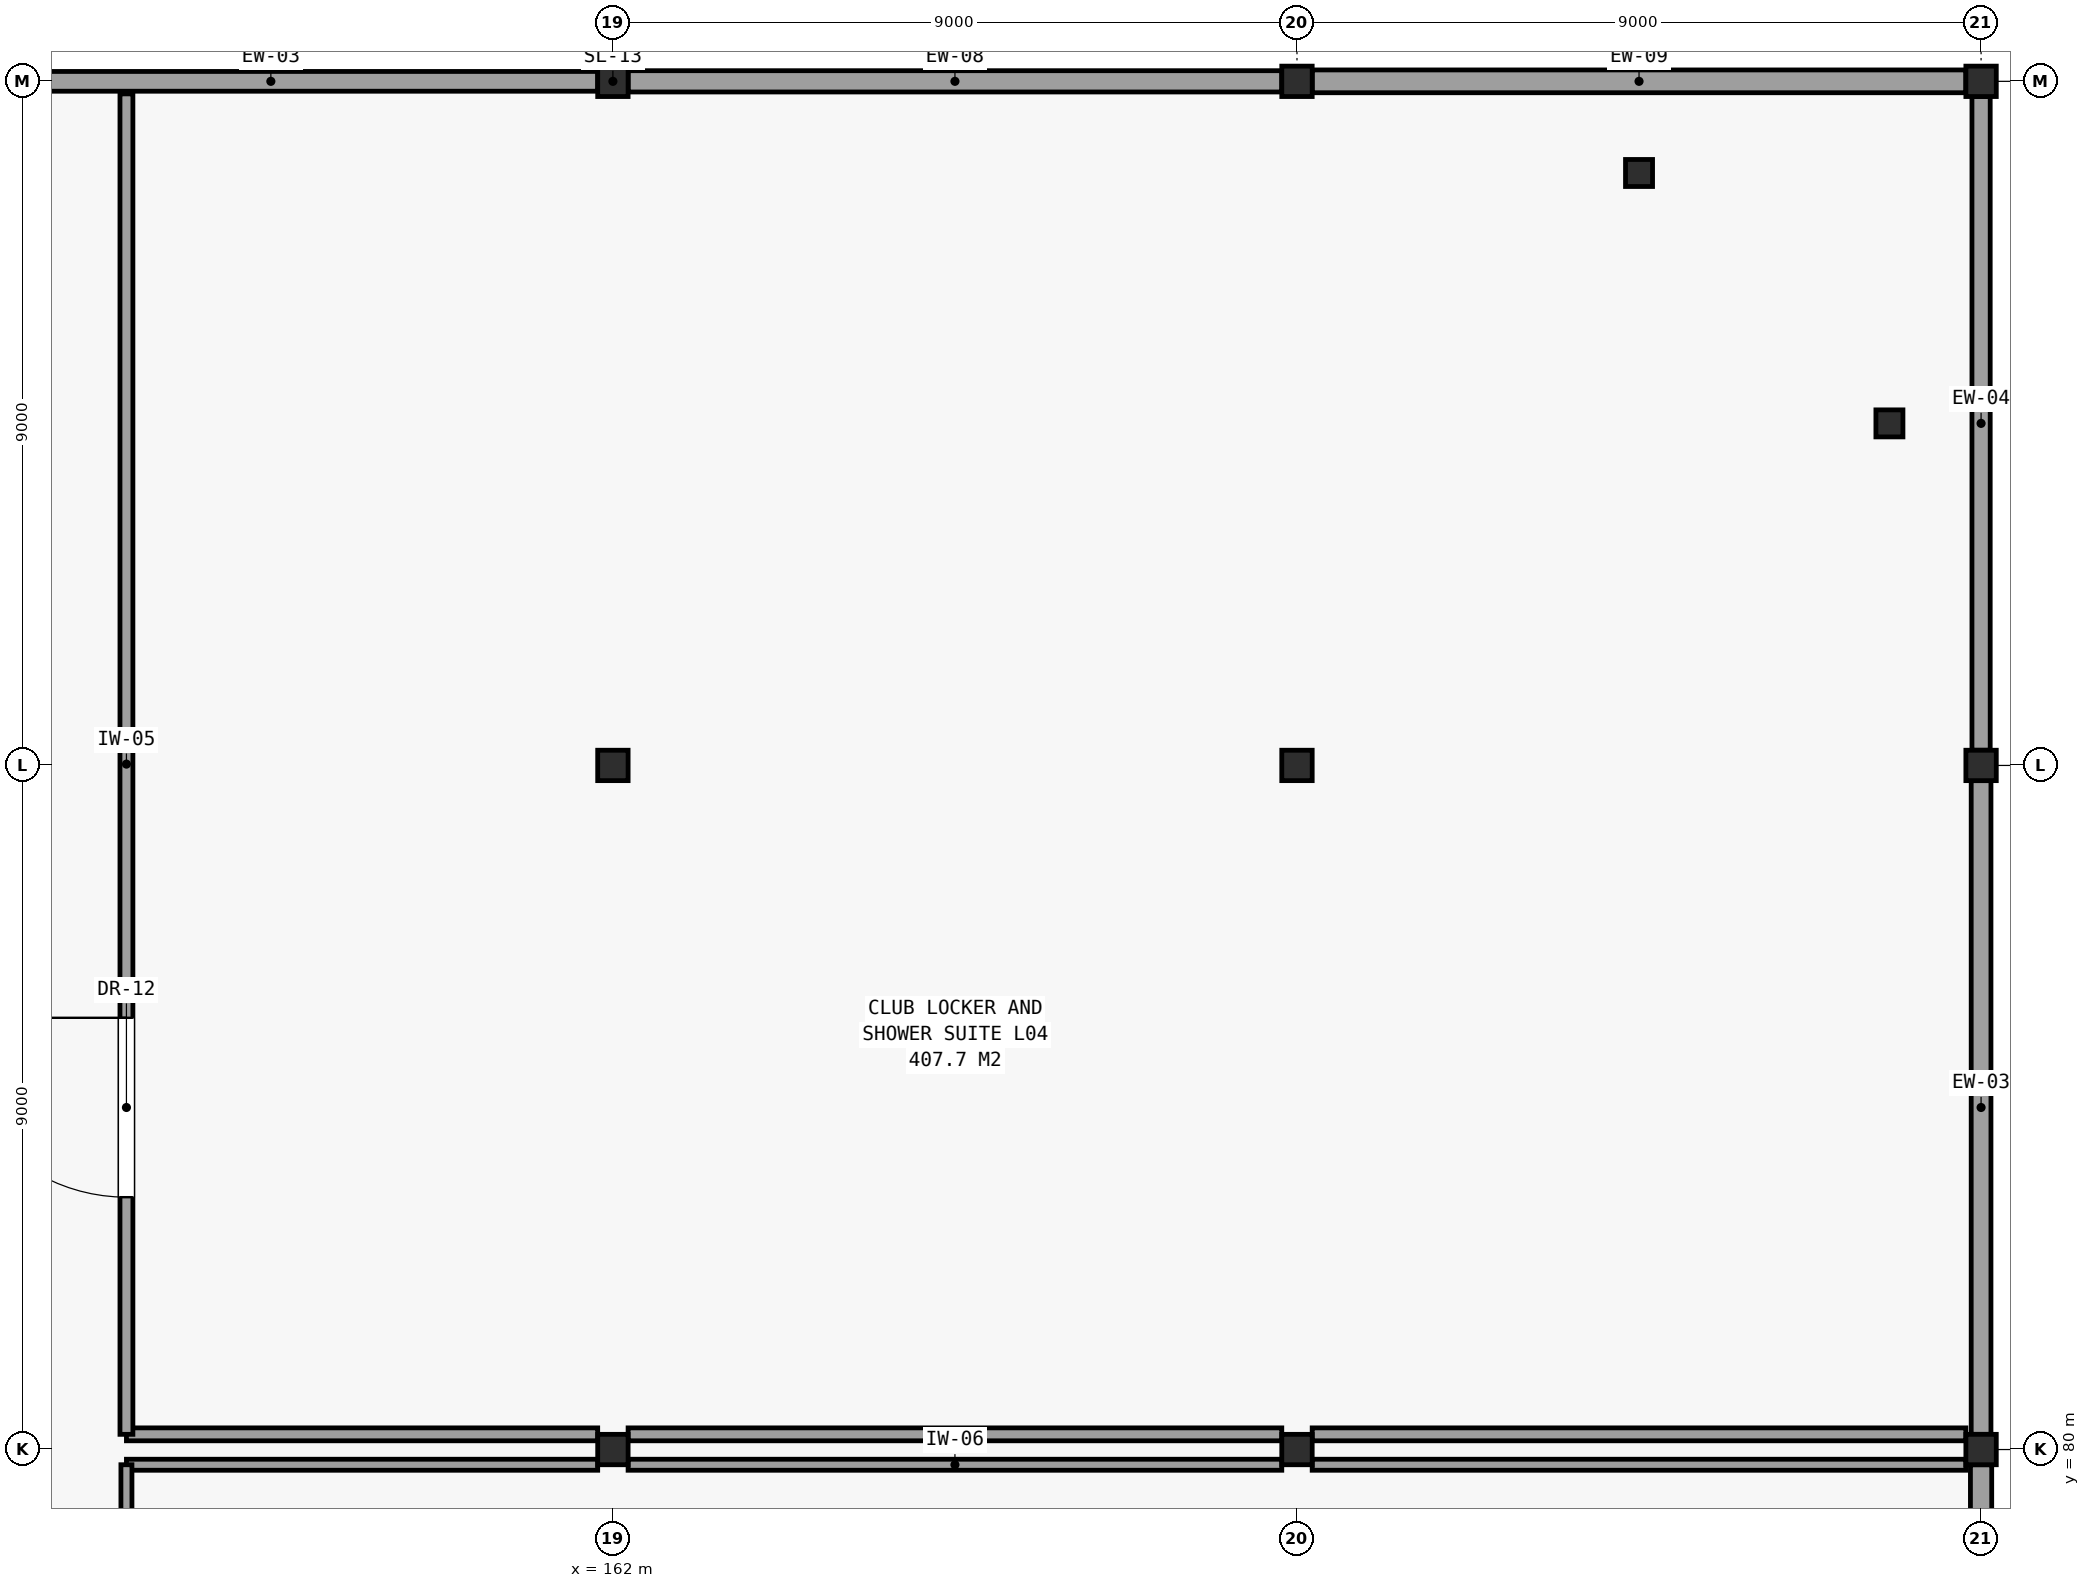
"""IFC4 building model, lengths in metres.
Left out: names, types, materials, properties, quantities, classifications, styles, units other than length and angle.
Written with IfcOpenShell. Run it as: python <this file> out.ifc"""

import sys

from ifc_helpers import new_model, si_unit, direction, frame, frame_2d, origin, origin_2d, place, context, subcontext, project, spatial, rectangle, hollow_rectangle, hollow_circle, extrude, element, fill, save


model = new_model("IFC4")
c1 = context("Model", 3, precision=1e-05, world=origin(), true_north=direction((0.0, 1.0)))
c2 = subcontext(c1, "Body", "Model", "MODEL_VIEW")
j1 = project(units=[si_unit("LENGTHUNIT", "METRE"), si_unit("PLANEANGLEUNIT", "RADIAN")], contexts=[c1])
p1 = place(None, origin())
s1 = spatial("IfcSite", under=j1, at=p1, CompositionType="ELEMENT")
p2 = place(p1, origin())
s2 = spatial("IfcBuilding", under=s1, at=p2, CompositionType="ELEMENT")
p3 = place(p2, frame((0.0, 0.0, 17.7)))
s3 = spatial("IfcBuildingStorey", under=s2, at=p3, CompositionType="ELEMENT", Elevation=17.7)
for number, where, z_axis, x_axis in (
    (1, (162.0, 80.0, 0.0), (0.0, 0.0, 1.0), (1.0, 0.0, 0.0)),
    (2, (162.0, 89.0, 0.0), (0.0, 0.0, 1.0), (1.0, 0.0, 0.0)),
    (3, (162.0, 98.0, 0.0), (0.0, 0.0, 1.0), (1.0, 0.0, 0.0)),
    (4, (171.0, 80.0, 0.0), (0.0, 0.0, 1.0), (1.0, 0.0, 0.0)),
    (5, (171.0, 89.0, 0.0), (0.0, 0.0, 1.0), (1.0, 0.0, 0.0)),
    (6, (171.0, 98.0, 0.0), (0.0, 0.0, 1.0), (1.0, 0.0, 0.0)),
):
    element("IfcColumn", number, at=place(p3, frame(where, z_axis=z_axis, x_axis=x_axis)), inside=s3, PredefinedType="COLUMN", context=c2, shape_type="SweptSolid", body=[
        extrude(hollow_rectangle(XDim=0.4, YDim=0.4, WallThickness=0.019, at=origin_2d()), origin(), (0.0, 0.0, 1.0), 4.2),
    ])
for number, where, z_axis, x_axis in (
    (7, (175.5, 96.794, 0.0), (0.0, 0.0, 1.0), (1.0, 0.0, 0.0)),
    (8, (178.794, 93.5, 0.0), (0.0, 0.0, 1.0), (1.0, 0.0, 0.0)),
):
    element("IfcColumn", number, at=place(p3, frame(where, z_axis=z_axis, x_axis=x_axis)), inside=s3, PredefinedType="COLUMN", context=c2, shape_type="SweptSolid", body=[
        extrude(hollow_circle(Radius=0.178, WallThickness=0.013, at=origin_2d()), origin(), (0.0, 0.0, 1.0), 4.2),
    ])
for number, where, z_axis, x_axis in (
    (9, (180.0, 80.0, 0.0), (0.0, 0.0, 1.0), (1.0, 0.0, 0.0)),
    (10, (180.0, 89.0, 0.0), (0.0, 0.0, 1.0), (1.0, 0.0, 0.0)),
):
    element("IfcColumn", number, at=place(p3, frame(where, z_axis=z_axis, x_axis=x_axis)), inside=s3, PredefinedType="COLUMN", context=c2, shape_type="SweptSolid", body=[
        extrude(hollow_rectangle(XDim=0.4, YDim=0.4, WallThickness=0.019, at=origin_2d()), origin(), (0.0, 0.0, 1.0), 4.2),
    ])
p4 = place(p3, frame((180.0, 98.0, 0.0), z_axis=(0.0, 0.0, 1.0), x_axis=(1.0, 0.0, 0.0)))
e11 = element("IfcColumn", 11, at=p4, inside=s3, PredefinedType="COLUMN", context=c2, shape_type="SweptSolid", body=[
    extrude(hollow_rectangle(XDim=0.4, YDim=0.4, WallThickness=0.019, at=origin_2d()), origin(), (0.0, 0.0, 1.0), 4.14),
])
p5 = place(p3, frame((180.0, 71.2, 0.0), z_axis=(0.0, 0.0, 1.0), x_axis=(0.0, 1.0, 0.0)))
e12 = element("IfcWall", 12, at=p5, inside=s3, PredefinedType="SOLIDWALL", context=c2, shape_type="SweptSolid", body=[
    extrude(rectangle(XDim=8.6, YDim=0.28, at=frame_2d((4.3, 0.0))), origin(), (0.0, 0.0, 1.0), 3.24),
])
p6 = place(p3, frame((180.0, 80.2, 0.0), z_axis=(0.0, 0.0, 1.0), x_axis=(0.0, 1.0, 0.0)))
e13 = element("IfcWall", 13, at=p6, inside=s3, PredefinedType="SOLIDWALL", context=c2, shape_type="SweptSolid", body=[
    extrude(rectangle(XDim=8.6, YDim=0.26, at=frame_2d((4.3, 0.0))), origin(), (0.0, 0.0, 1.0), 3.24),
])
p7 = place(p3, frame((180.0, 89.2, 0.0), z_axis=(0.0, 0.0, 1.0), x_axis=(0.0, 1.0, 0.0)))
e14 = element("IfcWall", 14, at=p7, inside=s3, PredefinedType="SOLIDWALL", context=c2, shape_type="SweptSolid", body=[
    extrude(rectangle(XDim=8.6, YDim=0.24, at=frame_2d((4.3, 0.0))), origin(), (0.0, 0.0, 1.0), 3.24),
])
p8 = place(p3, frame((179.8, 98.0, 0.0), z_axis=(0.0, 0.0, 1.0), x_axis=(-1.0, 0.0, 0.0)))
e15 = element("IfcWall", 15, at=p8, inside=s3, PredefinedType="SOLIDWALL", context=c2, shape_type="SweptSolid", body=[
    extrude(rectangle(XDim=8.6, YDim=0.3, at=frame_2d((4.3, 0.0))), origin(), (0.0, 0.0, 1.0), 3.24),
])
p9 = place(p3, frame((170.8, 98.0, 0.0), z_axis=(0.0, 0.0, 1.0), x_axis=(-1.0, 0.0, 0.0)))
e16 = element("IfcWall", 16, at=p9, inside=s3, PredefinedType="SOLIDWALL", context=c2, shape_type="SweptSolid", body=[
    extrude(rectangle(XDim=8.6, YDim=0.28, at=frame_2d((4.3, 0.0))), origin(), (0.0, 0.0, 1.0), 3.24),
])
p10 = place(p3, frame((161.8, 98.0, 0.0), z_axis=(0.0, 0.0, 1.0), x_axis=(-1.0, 0.0, 0.0)))
e17 = element("IfcWall", 17, at=p10, inside=s3, PredefinedType="SOLIDWALL", context=c2, shape_type="SweptSolid", body=[
    extrude(rectangle(XDim=8.6, YDim=0.26, at=frame_2d((4.3, 0.0))), origin(), (0.0, 0.0, 1.0), 3.24),
])
p11 = place(p3, frame((155.6, 79.8, 0.0), z_axis=(0.0, 0.0, 1.0), x_axis=(1.0, 0.0, 0.0)))
e18 = element("IfcWall", 18, at=p11, inside=s3, PredefinedType="PARTITIONING", context=c2, shape_type="SweptSolid", body=[
    extrude(rectangle(XDim=6.2, YDim=0.145, at=frame_2d((3.1, 0.0))), origin(), (0.0, 0.0, 1.0), 3.24),
])
for number, where, z_axis, x_axis in (
    (19, (162.2, 79.8, 0.0), (0.0, 0.0, 1.0), (1.0, 0.0, 0.0)),
    (20, (171.2, 79.8, 0.0), (0.0, 0.0, 1.0), (1.0, 0.0, 0.0)),
):
    element("IfcWall", number, at=place(p3, frame(where, z_axis=z_axis, x_axis=x_axis)), inside=s3, PredefinedType="PARTITIONING", context=c2, shape_type="SweptSolid", body=[
        extrude(rectangle(XDim=8.6, YDim=0.145, at=frame_2d((4.3, 0.0))), origin(), (0.0, 0.0, 1.0), 3.24),
    ])
p12 = place(p3, frame((155.6, 62.2, 0.0), z_axis=(0.0, 0.0, 1.0), x_axis=(0.0, 1.0, 0.0)))
e21 = element("IfcWall", 21, at=p12, inside=s3, PredefinedType="PARTITIONING", context=c2, shape_type="SweptSolid", body=[
    extrude(rectangle(XDim=17.6, YDim=0.145, at=frame_2d((8.8, 0.0))), origin(), (0.0, 0.0, 1.0), 3.24),
])
p13 = place(p12, frame((12.18, 0.0, 0.0)))
e22 = element("IfcOpeningElement", 22, at=p13, cuts=e21, PredefinedType="OPENING", context=c2, shape_type="SweptSolid", body=[
    extrude(rectangle(XDim=2.24, YDim=2.733, at=frame_2d((1.12, 1.366))), frame((0.0, 0.083, 0.0), z_axis=(0.0, -1.0, 0.0), x_axis=(1.0, 0.0, 0.0)), (0.0, 0.0, 1.0), 0.167),
])
p14 = place(p3, frame((155.6, 80.2, 0.0), z_axis=(0.0, 0.0, 1.0), x_axis=(1.0, 0.0, 0.0)))
e23 = element("IfcWall", 23, at=p14, inside=s3, PredefinedType="PARTITIONING", context=c2, shape_type="SweptSolid", body=[
    extrude(rectangle(XDim=6.2, YDim=0.17, at=frame_2d((3.1, 0.0))), origin(), (0.0, 0.0, 1.0), 3.24),
])
for number, where, z_axis, x_axis in (
    (24, (162.2, 80.2, 0.0), (0.0, 0.0, 1.0), (1.0, 0.0, 0.0)),
    (25, (171.2, 80.2, 0.0), (0.0, 0.0, 1.0), (1.0, 0.0, 0.0)),
):
    element("IfcWall", number, at=place(p3, frame(where, z_axis=z_axis, x_axis=x_axis)), inside=s3, PredefinedType="PARTITIONING", context=c2, shape_type="SweptSolid", body=[
        extrude(rectangle(XDim=8.6, YDim=0.17, at=frame_2d((4.3, 0.0))), origin(), (0.0, 0.0, 1.0), 3.24),
    ])
p15 = place(p3, frame((155.6, 80.2, 0.0), z_axis=(0.0, 0.0, 1.0), x_axis=(0.0, 1.0, 0.0)))
e26 = element("IfcWall", 26, at=p15, inside=s3, PredefinedType="PARTITIONING", context=c2, shape_type="SweptSolid", body=[
    extrude(rectangle(XDim=17.635, YDim=0.17, at=frame_2d((8.817, 0.0))), origin(), (0.0, 0.0, 1.0), 3.24),
])
p16 = place(p15, frame((3.12, 0.0, 0.0)))
e27 = element("IfcOpeningElement", 27, at=p16, cuts=e26, PredefinedType="OPENING", context=c2, shape_type="SweptSolid", body=[
    extrude(rectangle(XDim=2.36, YDim=2.879, at=frame_2d((1.18, 1.439))), frame((0.0, 0.096, 0.0), z_axis=(0.0, -1.0, 0.0), x_axis=(1.0, 0.0, 0.0)), (0.0, 0.0, 1.0), 0.192),
])
p17 = place(p16, origin())
e28 = element("IfcDoor", 28, at=p17, inside=s3, OperationType="SINGLE_SWING_RIGHT", PredefinedType="DOOR", context=c2, shape_type="SweptSolid", body=[
    extrude(rectangle(XDim=2.36, YDim=2.879, at=frame_2d((1.18, 1.439))), frame((0.0, 0.025, 0.0), z_axis=(0.0, -1.0, 0.0), x_axis=(1.0, 0.0, 0.0)), (0.0, 0.0, 1.0), 0.05),
])
fill(e27, e28)
save(model, sys.argv[1])
